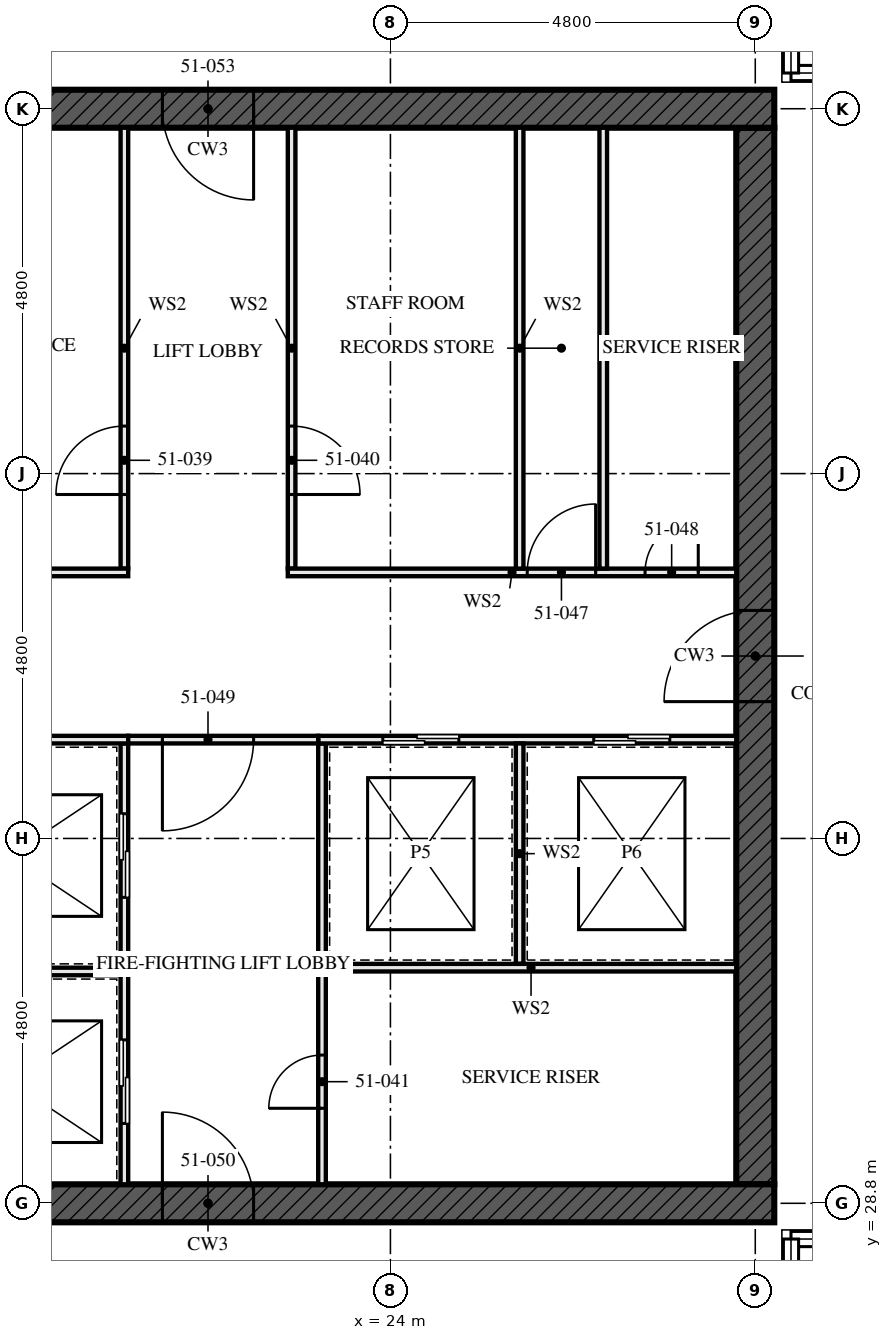
"""IFC4 building model, lengths in metres.
Left out: names, types, materials, properties, quantities, classifications, styles, units other than length and angle.
Written with IfcOpenShell. Run it as: python <this file> out.ifc"""

import sys

from ifc_helpers import new_model, si_unit, direction, frame, frame_2d, origin, place, context, subcontext, project, spatial, rectangle, extrude, element, fill, save


model = new_model("IFC4")
c1 = context("Model", 3, precision=1e-05, world=origin(), true_north=direction((0.0, 1.0)))
c2 = subcontext(c1, "Body", "Model", "MODEL_VIEW")
j1 = project(units=[si_unit("LENGTHUNIT", "METRE"), si_unit("PLANEANGLEUNIT", "RADIAN")], contexts=[c1])
p1 = place(None, origin())
s1 = spatial("IfcSite", under=j1, at=p1, CompositionType="ELEMENT")
p2 = place(p1, origin())
s2 = spatial("IfcBuilding", under=s1, at=p2, CompositionType="ELEMENT")
p3 = place(p2, frame((0.0, 0.0, 186.5)))
s3 = spatial("IfcBuildingStorey", under=s2, at=p3, CompositionType="ELEMENT", Elevation=186.5)
p4 = place(p3, frame((14.15, 28.8, -0.17), z_axis=(0.0, 0.0, 1.0), x_axis=(1.0, 0.0, 0.0)))
e1 = element("IfcWall", 1, at=p4, inside=s3, PredefinedType="SHEAR", context=c2, shape_type="SweptSolid", body=[
    extrude(rectangle(XDim=14.9, YDim=0.5, at=frame_2d((7.45, 0.0))), origin(), (0.0, 0.0, 1.0), 3.42),
])
p5 = place(p4, frame((6.85, 0.0, 0.17)))
e2 = element("IfcOpeningElement", 2, at=p5, cuts=e1, PredefinedType="OPENING", context=c2, shape_type="SweptSolid", body=[
    extrude(rectangle(XDim=1.2, YDim=2.1, at=frame_2d((0.6, 1.05))), frame((0.0, 0.26, 0.0), z_axis=(0.0, -1.0, 0.0), x_axis=(1.0, 0.0, 0.0)), (0.0, 0.0, 1.0), 0.521),
])
p6 = place(p3, frame((29.05, 43.2, -0.17), z_axis=(0.0, 0.0, 1.0), x_axis=(-1.0, 0.0, 0.0)))
e3 = element("IfcWall", 3, at=p6, inside=s3, PredefinedType="SHEAR", context=c2, shape_type="SweptSolid", body=[
    extrude(rectangle(XDim=14.9, YDim=0.5, at=frame_2d((7.45, 0.0))), origin(), (0.0, 0.0, 1.0), 3.42),
])
p7 = place(p6, frame((6.85, 0.0, 0.17)))
e4 = element("IfcOpeningElement", 4, at=p7, cuts=e3, PredefinedType="OPENING", context=c2, shape_type="SweptSolid", body=[
    extrude(rectangle(XDim=1.2, YDim=2.1, at=frame_2d((0.6, 1.05))), frame((0.0, 0.26, 0.0), z_axis=(0.0, -1.0, 0.0), x_axis=(1.0, 0.0, 0.0)), (0.0, 0.0, 1.0), 0.521),
])
p8 = place(p3, frame((28.8, 29.05, -0.17), z_axis=(0.0, 0.0, 1.0), x_axis=(0.0, 1.0, 0.0)))
e5 = element("IfcWall", 5, at=p8, inside=s3, PredefinedType="SHEAR", context=c2, shape_type="SweptSolid", body=[
    extrude(rectangle(XDim=13.9, YDim=0.5, at=frame_2d((6.95, 0.0))), origin(), (0.0, 0.0, 1.0), 3.42),
])
p9 = place(p8, frame((6.35, 0.0, 0.17)))
e6 = element("IfcOpeningElement", 6, at=p9, cuts=e5, PredefinedType="OPENING", context=c2, shape_type="SweptSolid", body=[
    extrude(rectangle(XDim=1.2, YDim=2.1, at=frame_2d((0.6, 1.05))), frame((0.0, 0.26, 0.0), z_axis=(0.0, -1.0, 0.0), x_axis=(1.0, 0.0, 0.0)), (0.0, 0.0, 1.0), 0.521),
])
p10 = place(p3, frame((26.8, 37.15, 0.0), z_axis=(0.0, 0.0, 1.0), x_axis=(0.0, 1.0, 0.0)))
e7 = element("IfcWall", 7, at=p10, inside=s3, PredefinedType="SOLIDWALL", context=c2, shape_type="SweptSolid", body=[
    extrude(rectangle(XDim=5.8, YDim=0.1, at=frame_2d((2.9, 0.0))), origin(), (0.0, 0.0, 1.0), 3.25),
])
p11 = place(p3, frame((20.5, 29.05, 0.0), z_axis=(0.0, 0.0, 1.0), x_axis=(0.0, 1.0, 0.0)))
e8 = element("IfcWall", 8, at=p11, inside=s3, PredefinedType="SOLIDWALL", context=c2, shape_type="SweptSolid", body=[
    extrude(rectangle(XDim=5.8, YDim=0.1, at=frame_2d((2.9, 0.0))), origin(), (0.0, 0.0, 1.0), 3.25),
])
p12 = place(p11, frame((0.8, 0.0, 0.0)))
e9 = element("IfcOpeningElement", 9, at=p12, cuts=e8, PredefinedType="OPENING", context=c2, shape_type="SweptSolid", body=[
    extrude(rectangle(XDim=1.1, YDim=2.3, at=frame_2d((0.55, 1.15))), frame((0.0, 0.061, 0.0), z_axis=(0.0, -1.0, 0.0), x_axis=(1.0, 0.0, 0.0)), (0.0, 0.0, 1.0), 0.121),
])
p13 = place(p11, frame((3.775, 0.0, 0.0)))
e10 = element("IfcOpeningElement", 10, at=p13, cuts=e8, PredefinedType="OPENING", context=c2, shape_type="SweptSolid", body=[
    extrude(rectangle(XDim=1.1, YDim=2.3, at=frame_2d((0.55, 1.15))), frame((0.0, 0.061, 0.0), z_axis=(0.0, -1.0, 0.0), x_axis=(1.0, 0.0, 0.0)), (0.0, 0.0, 1.0), 0.121),
])
p14 = place(p3, frame((20.5, 37.15, 0.0), z_axis=(0.0, 0.0, 1.0), x_axis=(0.0, 1.0, 0.0)))
e11 = element("IfcWall", 11, at=p14, inside=s3, PredefinedType="SOLIDWALL", context=c2, shape_type="SweptSolid", body=[
    extrude(rectangle(XDim=5.8, YDim=0.1, at=frame_2d((2.9, 0.0))), origin(), (0.0, 0.0, 1.0), 3.25),
])
p15 = place(p14, frame((0.975, 0.0, 0.0)))
e12 = element("IfcOpeningElement", 12, at=p15, cuts=e11, PredefinedType="OPENING", context=c2, shape_type="SweptSolid", body=[
    extrude(rectangle(XDim=0.9, YDim=2.1, at=frame_2d((0.45, 1.05))), frame((0.0, 0.061, 0.0), z_axis=(0.0, -1.0, 0.0), x_axis=(1.0, 0.0, 0.0)), (0.0, 0.0, 1.0), 0.121),
])
p16 = place(p3, frame((22.7, 37.15, 0.0), z_axis=(0.0, 0.0, 1.0), x_axis=(0.0, 1.0, 0.0)))
e13 = element("IfcWall", 13, at=p16, inside=s3, PredefinedType="SOLIDWALL", context=c2, shape_type="SweptSolid", body=[
    extrude(rectangle(XDim=5.8, YDim=0.1, at=frame_2d((2.9, 0.0))), origin(), (0.0, 0.0, 1.0), 3.25),
])
p17 = place(p16, frame((0.975, 0.0, 0.0)))
e14 = element("IfcOpeningElement", 14, at=p17, cuts=e13, PredefinedType="OPENING", context=c2, shape_type="SweptSolid", body=[
    extrude(rectangle(XDim=0.9, YDim=2.1, at=frame_2d((0.45, 1.05))), frame((0.0, 0.061, 0.0), z_axis=(0.0, -1.0, 0.0), x_axis=(1.0, 0.0, 0.0)), (0.0, 0.0, 1.0), 0.121),
])
p18 = place(p3, frame((23.1, 29.05, 0.0), z_axis=(0.0, 0.0, 1.0), x_axis=(0.0, 1.0, 0.0)))
e15 = element("IfcWall", 15, at=p18, inside=s3, PredefinedType="SOLIDWALL", context=c2, shape_type="SweptSolid", body=[
    extrude(rectangle(XDim=5.8, YDim=0.1, at=frame_2d((2.9, 0.0))), origin(), (0.0, 0.0, 1.0), 3.25),
])
p19 = place(p18, frame((1.0, 0.0, 0.0)))
e16 = element("IfcOpeningElement", 16, at=p19, cuts=e15, PredefinedType="OPENING", context=c2, shape_type="SweptSolid", body=[
    extrude(rectangle(XDim=0.7, YDim=2.1, at=frame_2d((0.35, 1.05))), frame((0.0, 0.061, 0.0), z_axis=(0.0, -1.0, 0.0), x_axis=(1.0, 0.0, 0.0)), (0.0, 0.0, 1.0), 0.121),
])
p20 = place(p3, frame((14.65, 34.9, 0.0), z_axis=(0.0, 0.0, 1.0), x_axis=(1.0, 0.0, 0.0)))
e17 = element("IfcWall", 17, at=p20, inside=s3, PredefinedType="SOLIDWALL", context=c2, shape_type="SweptSolid", body=[
    extrude(rectangle(XDim=5.9, YDim=0.1, at=frame_2d((2.95, 0.0))), origin(), (0.0, 0.0, 1.0), 3.25),
])
p21 = place(p20, frame((1.6, 0.0, 0.0)))
e18 = element("IfcOpeningElement", 18, at=p21, cuts=e17, PredefinedType="OPENING", context=c2, shape_type="SweptSolid", body=[
    extrude(rectangle(XDim=0.7, YDim=2.1, at=frame_2d((0.35, 1.05))), frame((0.0, 0.061, 0.0), z_axis=(0.0, -1.0, 0.0), x_axis=(1.0, 0.0, 0.0)), (0.0, 0.0, 1.0), 0.121),
])
p22 = place(p3, frame((23.05, 34.9, 0.0), z_axis=(0.0, 0.0, 1.0), x_axis=(1.0, 0.0, 0.0)))
e19 = element("IfcWall", 19, at=p22, inside=s3, PredefinedType="SOLIDWALL", context=c2, shape_type="SweptSolid", body=[
    extrude(rectangle(XDim=5.5, YDim=0.1, at=frame_2d((2.75, 0.0))), origin(), (0.0, 0.0, 1.0), 3.25),
])
p23 = place(p22, frame((0.85, 0.0, 0.0)))
e20 = element("IfcOpeningElement", 20, at=p23, cuts=e19, PredefinedType="OPENING", context=c2, shape_type="SweptSolid", body=[
    extrude(rectangle(XDim=1.0, YDim=2.1, at=frame_2d((0.5, 1.05))), frame((0.0, 0.061, 0.0), z_axis=(0.0, -1.0, 0.0), x_axis=(1.0, 0.0, 0.0)), (0.0, 0.0, 1.0), 0.121),
])
p24 = place(p22, frame((3.625, 0.0, 0.0)))
e21 = element("IfcOpeningElement", 21, at=p24, cuts=e19, PredefinedType="OPENING", context=c2, shape_type="SweptSolid", body=[
    extrude(rectangle(XDim=1.0, YDim=2.1, at=frame_2d((0.5, 1.05))), frame((0.0, 0.061, 0.0), z_axis=(0.0, -1.0, 0.0), x_axis=(1.0, 0.0, 0.0)), (0.0, 0.0, 1.0), 0.121),
])
p25 = place(p3, frame((14.65, 37.1, 0.0), z_axis=(0.0, 0.0, 1.0), x_axis=(1.0, 0.0, 0.0)))
e22 = element("IfcWall", 22, at=p25, inside=s3, PredefinedType="SOLIDWALL", context=c2, shape_type="SweptSolid", body=[
    extrude(rectangle(XDim=5.9, YDim=0.1, at=frame_2d((2.95, 0.0))), origin(), (0.0, 0.0, 1.0), 3.25),
])
p26 = place(p25, frame((0.5, 0.0, 0.0)))
e23 = element("IfcOpeningElement", 23, at=p26, cuts=e22, PredefinedType="OPENING", context=c2, shape_type="SweptSolid", body=[
    extrude(rectangle(XDim=0.7, YDim=2.1, at=frame_2d((0.35, 1.05))), frame((0.0, 0.061, 0.0), z_axis=(0.0, -1.0, 0.0), x_axis=(1.0, 0.0, 0.0)), (0.0, 0.0, 1.0), 0.121),
])
p27 = place(p25, frame((1.9, 0.0, 0.0)))
e24 = element("IfcOpeningElement", 24, at=p27, cuts=e22, PredefinedType="OPENING", context=c2, shape_type="SweptSolid", body=[
    extrude(rectangle(XDim=0.9, YDim=2.1, at=frame_2d((0.45, 1.05))), frame((0.0, 0.061, 0.0), z_axis=(0.0, -1.0, 0.0), x_axis=(1.0, 0.0, 0.0)), (0.0, 0.0, 1.0), 0.121),
])
p28 = place(p3, frame((22.65, 37.1, 0.0), z_axis=(0.0, 0.0, 1.0), x_axis=(1.0, 0.0, 0.0)))
e25 = element("IfcWall", 25, at=p28, inside=s3, PredefinedType="SOLIDWALL", context=c2, shape_type="SweptSolid", body=[
    extrude(rectangle(XDim=5.9, YDim=0.1, at=frame_2d((2.95, 0.0))), origin(), (0.0, 0.0, 1.0), 3.25),
])
p29 = place(p28, frame((3.15, 0.0, 0.0)))
e26 = element("IfcOpeningElement", 26, at=p29, cuts=e25, PredefinedType="OPENING", context=c2, shape_type="SweptSolid", body=[
    extrude(rectangle(XDim=0.9, YDim=2.1, at=frame_2d((0.45, 1.05))), frame((0.0, 0.061, 0.0), z_axis=(0.0, -1.0, 0.0), x_axis=(1.0, 0.0, 0.0)), (0.0, 0.0, 1.0), 0.121),
])
p30 = place(p28, frame((4.7, 0.0, 0.0)))
e27 = element("IfcOpeningElement", 27, at=p30, cuts=e25, PredefinedType="OPENING", context=c2, shape_type="SweptSolid", body=[
    extrude(rectangle(XDim=0.7, YDim=2.1, at=frame_2d((0.35, 1.05))), frame((0.0, 0.061, 0.0), z_axis=(0.0, -1.0, 0.0), x_axis=(1.0, 0.0, 0.0)), (0.0, 0.0, 1.0), 0.121),
])
p31 = place(p3, frame((20.55, 34.9, 0.0), z_axis=(0.0, 0.0, 1.0), x_axis=(1.0, 0.0, 0.0)))
e28 = element("IfcWall", 28, at=p31, inside=s3, PredefinedType="SOLIDWALL", context=c2, shape_type="SweptSolid", body=[
    extrude(rectangle(XDim=2.5, YDim=0.1, at=frame_2d((1.25, 0.0))), origin(), (0.0, 0.0, 1.0), 3.25),
])
p32 = place(p31, frame((0.45, 0.0, 0.0)))
e29 = element("IfcOpeningElement", 29, at=p32, cuts=e28, PredefinedType="OPENING", context=c2, shape_type="SweptSolid", body=[
    extrude(rectangle(XDim=1.2, YDim=2.1, at=frame_2d((0.6, 1.05))), frame((0.0, 0.061, 0.0), z_axis=(0.0, -1.0, 0.0), x_axis=(1.0, 0.0, 0.0)), (0.0, 0.0, 1.0), 0.121),
])
p33 = place(p3, frame((17.55, 31.85, 0.0), z_axis=(0.0, 0.0, 1.0), x_axis=(1.0, 0.0, 0.0)))
e30 = element("IfcWall", 30, at=p33, inside=s3, PredefinedType="SOLIDWALL", context=c2, shape_type="SweptSolid", body=[
    extrude(rectangle(XDim=2.9, YDim=0.1, at=frame_2d((1.45, 0.0))), origin(), (0.0, 0.0, 1.0), 3.25),
])
p34 = place(p3, frame((25.7, 37.15, 0.0), z_axis=(0.0, 0.0, 1.0), x_axis=(0.0, 1.0, 0.0)))
e31 = element("IfcWall", 31, at=p34, inside=s3, PredefinedType="SOLIDWALL", context=c2, shape_type="SweptSolid", body=[
    extrude(rectangle(XDim=5.8, YDim=0.1, at=frame_2d((2.9, 0.0))), origin(), (0.0, 0.0, 1.0), 3.25),
])
p35 = place(p3, frame((25.7, 31.95, 0.0), z_axis=(0.0, 0.0, 1.0), x_axis=(0.0, 1.0, 0.0)))
e32 = element("IfcWall", 32, at=p35, inside=s3, PredefinedType="SOLIDWALL", context=c2, shape_type="SweptSolid", body=[
    extrude(rectangle(XDim=2.9, YDim=0.1, at=frame_2d((1.45, 0.0))), origin(), (0.0, 0.0, 1.0), 3.25),
])
p36 = place(p3, frame((23.15, 31.9, 0.0), z_axis=(0.0, 0.0, 1.0), x_axis=(1.0, 0.0, 0.0)))
e33 = element("IfcWall", 33, at=p36, inside=s3, PredefinedType="SOLIDWALL", context=c2, shape_type="SweptSolid", body=[
    extrude(rectangle(XDim=5.4, YDim=0.1, at=frame_2d((2.7, 0.0))), origin(), (0.0, 0.0, 1.0), 3.25),
])
p37 = place(p12, origin())
e34 = element("IfcDoor", 34, at=p37, inside=s3, OperationType="SLIDING_TO_LEFT", PredefinedType="DOOR", context=c2, shape_type="SweptSolid", body=[
    extrude(rectangle(XDim=1.1, YDim=2.3, at=frame_2d((0.55, 1.15))), frame((0.0, 0.05, 0.0), z_axis=(0.0, -1.0, 0.0), x_axis=(1.0, 0.0, 0.0)), (0.0, 0.0, 1.0), 0.1),
])
fill(e9, e34)
p38 = place(p13, origin())
e35 = element("IfcDoor", 35, at=p38, inside=s3, OperationType="SLIDING_TO_LEFT", PredefinedType="DOOR", context=c2, shape_type="SweptSolid", body=[
    extrude(rectangle(XDim=1.1, YDim=2.3, at=frame_2d((0.55, 1.15))), frame((0.0, 0.05, 0.0), z_axis=(0.0, -1.0, 0.0), x_axis=(1.0, 0.0, 0.0)), (0.0, 0.0, 1.0), 0.1),
])
fill(e10, e35)
p39 = place(p15, origin())
e36 = element("IfcDoor", 36, at=p39, inside=s3, OperationType="SINGLE_SWING_RIGHT", PredefinedType="DOOR", context=c2, shape_type="SweptSolid", body=[
    extrude(rectangle(XDim=0.9, YDim=2.1, at=frame_2d((0.45, 1.05))), frame((0.0, 0.027, 0.0), z_axis=(0.0, -1.0, 0.0), x_axis=(1.0, 0.0, 0.0)), (0.0, 0.0, 1.0), 0.054),
])
fill(e12, e36)
p40 = place(p17, frame((0.9, 0.0, 0.0), z_axis=(0.0, 0.0, 1.0), x_axis=(-1.0, 0.0, 0.0)))
e37 = element("IfcDoor", 37, at=p40, inside=s3, OperationType="SINGLE_SWING_LEFT", PredefinedType="DOOR", context=c2, shape_type="SweptSolid", body=[
    extrude(rectangle(XDim=0.9, YDim=2.1, at=frame_2d((0.45, 1.05))), frame((0.0, 0.027, 0.0), z_axis=(0.0, -1.0, 0.0), x_axis=(1.0, 0.0, 0.0)), (0.0, 0.0, 1.0), 0.054),
])
fill(e14, e37)
p41 = place(p19, origin())
e38 = element("IfcDoor", 38, at=p41, inside=s3, OperationType="SINGLE_SWING_RIGHT", PredefinedType="DOOR", context=c2, shape_type="SweptSolid", body=[
    extrude(rectangle(XDim=0.7, YDim=2.1, at=frame_2d((0.35, 1.05))), frame((0.0, 0.027, 0.0), z_axis=(0.0, -1.0, 0.0), x_axis=(1.0, 0.0, 0.0)), (0.0, 0.0, 1.0), 0.054),
])
fill(e16, e38)
p42 = place(p23, origin())
e39 = element("IfcDoor", 39, at=p42, inside=s3, OperationType="SLIDING_TO_LEFT", PredefinedType="DOOR", context=c2, shape_type="SweptSolid", body=[
    extrude(rectangle(XDim=1.0, YDim=2.1, at=frame_2d((0.5, 1.05))), frame((0.0, 0.05, 0.0), z_axis=(0.0, -1.0, 0.0), x_axis=(1.0, 0.0, 0.0)), (0.0, 0.0, 1.0), 0.1),
])
fill(e20, e39)
p43 = place(p24, origin())
e40 = element("IfcDoor", 40, at=p43, inside=s3, OperationType="SLIDING_TO_LEFT", PredefinedType="DOOR", context=c2, shape_type="SweptSolid", body=[
    extrude(rectangle(XDim=1.0, YDim=2.1, at=frame_2d((0.5, 1.05))), frame((0.0, 0.05, 0.0), z_axis=(0.0, -1.0, 0.0), x_axis=(1.0, 0.0, 0.0)), (0.0, 0.0, 1.0), 0.1),
])
fill(e21, e40)
p44 = place(p29, origin())
e41 = element("IfcDoor", 41, at=p44, inside=s3, OperationType="SINGLE_SWING_LEFT", PredefinedType="DOOR", context=c2, shape_type="SweptSolid", body=[
    extrude(rectangle(XDim=0.9, YDim=2.1, at=frame_2d((0.45, 1.05))), frame((0.0, 0.027, 0.0), z_axis=(0.0, -1.0, 0.0), x_axis=(1.0, 0.0, 0.0)), (0.0, 0.0, 1.0), 0.054),
])
fill(e26, e41)
p45 = place(p30, origin())
e42 = element("IfcDoor", 42, at=p45, inside=s3, OperationType="SINGLE_SWING_LEFT", PredefinedType="DOOR", context=c2, shape_type="SweptSolid", body=[
    extrude(rectangle(XDim=0.7, YDim=2.1, at=frame_2d((0.35, 1.05))), frame((0.0, 0.027, 0.0), z_axis=(0.0, -1.0, 0.0), x_axis=(1.0, 0.0, 0.0)), (0.0, 0.0, 1.0), 0.054),
])
fill(e27, e42)
p46 = place(p32, frame((1.2, 0.0, 0.0), z_axis=(0.0, 0.0, 1.0), x_axis=(-1.0, 0.0, 0.0)))
e43 = element("IfcDoor", 43, at=p46, inside=s3, OperationType="SINGLE_SWING_LEFT", PredefinedType="DOOR", context=c2, shape_type="SweptSolid", body=[
    extrude(rectangle(XDim=1.2, YDim=2.1, at=frame_2d((0.6, 1.05))), frame((0.0, 0.027, 0.0), z_axis=(0.0, -1.0, 0.0), x_axis=(1.0, 0.0, 0.0)), (0.0, 0.0, 1.0), 0.054),
])
fill(e29, e43)
p47 = place(p5, origin())
e44 = element("IfcDoor", 44, at=p47, inside=s3, OperationType="SINGLE_SWING_LEFT", PredefinedType="DOOR", context=c2, shape_type="SweptSolid", body=[
    extrude(rectangle(XDim=1.2, YDim=2.1, at=frame_2d((0.6, 1.05))), frame((0.0, 0.027, 0.0), z_axis=(0.0, -1.0, 0.0), x_axis=(1.0, 0.0, 0.0)), (0.0, 0.0, 1.0), 0.054),
])
fill(e2, e44)
p48 = place(p9, origin())
e45 = element("IfcDoor", 45, at=p48, inside=s3, OperationType="SINGLE_SWING_LEFT", PredefinedType="DOOR", context=c2, shape_type="SweptSolid", body=[
    extrude(rectangle(XDim=1.2, YDim=2.1, at=frame_2d((0.6, 1.05))), frame((0.0, 0.027, 0.0), z_axis=(0.0, -1.0, 0.0), x_axis=(1.0, 0.0, 0.0)), (0.0, 0.0, 1.0), 0.054),
])
fill(e6, e45)
p49 = place(p7, origin())
e46 = element("IfcDoor", 46, at=p49, inside=s3, OperationType="SINGLE_SWING_LEFT", PredefinedType="DOOR", context=c2, shape_type="SweptSolid", body=[
    extrude(rectangle(XDim=1.2, YDim=2.1, at=frame_2d((0.6, 1.05))), frame((0.0, 0.027, 0.0), z_axis=(0.0, -1.0, 0.0), x_axis=(1.0, 0.0, 0.0)), (0.0, 0.0, 1.0), 0.054),
])
fill(e4, e46)
save(model, sys.argv[1])
